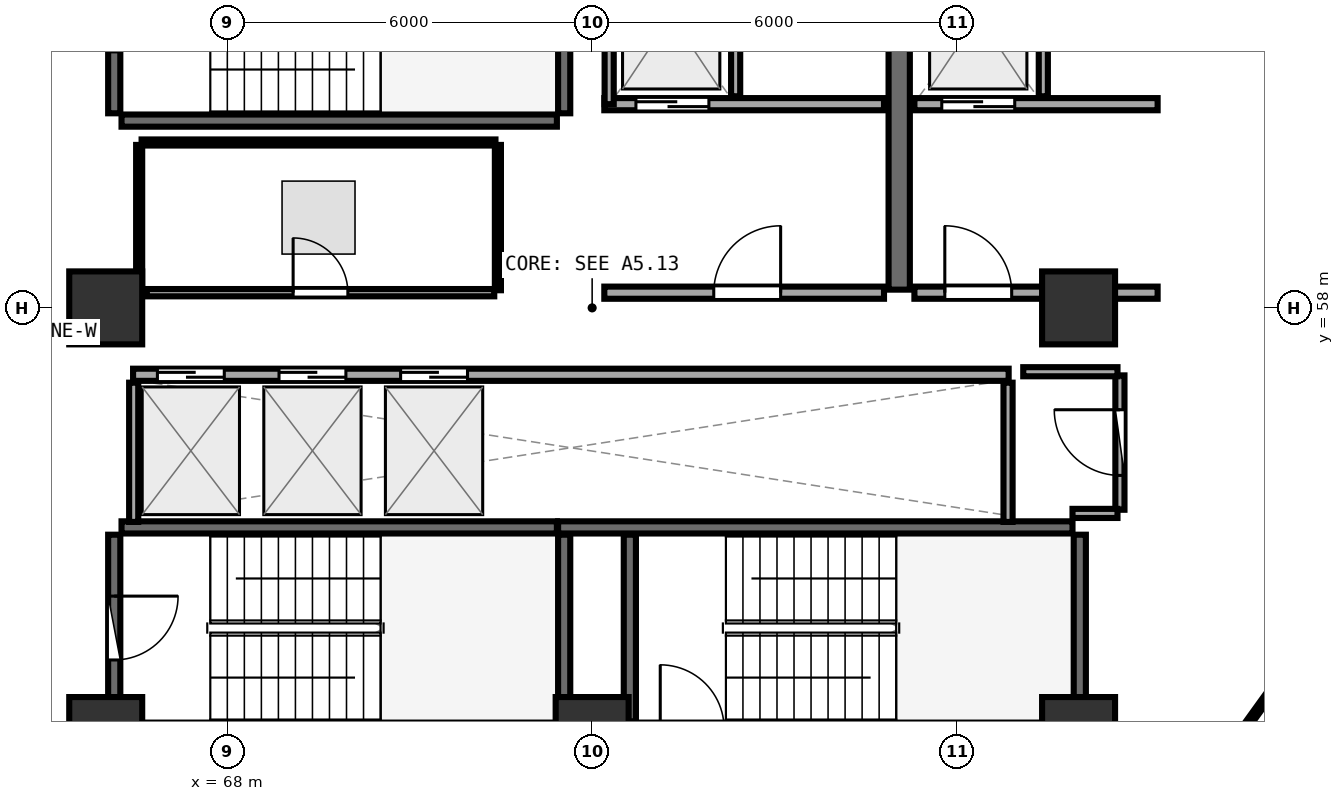
"""IFC4 building model, lengths in metres.
Left out: names, types, materials, properties, quantities, classifications, styles, units other than length and angle.
Written with IfcOpenShell. Run it as: python <this file> out.ifc"""

import sys

from ifc_helpers import new_model, si_unit, direction, frame, frame_2d, origin, origin_2d, place, context, subcontext, project, spatial, rectangle, extrude, element, fill, save


model = new_model("IFC4")
c1 = context("Model", 3, precision=1e-05, world=origin(), true_north=direction((0.0, 1.0)))
c2 = subcontext(c1, "Body", "Model", "MODEL_VIEW")
j1 = project(units=[si_unit("LENGTHUNIT", "METRE"), si_unit("PLANEANGLEUNIT", "RADIAN")], contexts=[c1])
p1 = place(None, origin())
s1 = spatial("IfcSite", under=j1, at=p1, CompositionType="ELEMENT")
p2 = place(p1, origin())
s2 = spatial("IfcBuilding", under=s1, at=p2, CompositionType="ELEMENT")
p3 = place(p2, frame((0.0, 0.0, 173.1)))
s3 = spatial("IfcBuildingStorey", under=s2, at=p3, CompositionType="ELEMENT", Elevation=173.1)
for number, where, z_axis, x_axis in (
    (1, (66.0, 51.0, 0.0), (0.0, 0.0, 1.0), (1.0, 0.0, 0.0)),
    (2, (74.0, 51.0, 0.0), (0.0, 0.0, 1.0), (1.0, 0.0, 0.0)),
    (3, (82.0, 51.0, 0.0), (0.0, 0.0, 1.0), (1.0, 0.0, 0.0)),
    (4, (82.0, 58.0, 0.0), (0.0, 0.0, 1.0), (1.0, 0.0, 0.0)),
    (5, (66.0, 58.0, 0.0), (0.0, 0.0, 1.0), (1.0, 0.0, 0.0)),
):
    element("IfcColumn", number, at=place(p3, frame(where, z_axis=z_axis, x_axis=x_axis)), inside=s3, PredefinedType="PILASTER", context=c2, shape_type="SweptSolid", body=[
        extrude(rectangle(XDim=1.2, YDim=1.2, at=origin_2d()), origin(), (0.0, 0.0, 1.0), 3.75),
    ])
p4 = place(p3, frame((66.26, 61.08, 0.0), z_axis=(0.0, 0.0, 1.0), x_axis=(1.0, 0.0, 0.0)))
e6 = element("IfcWall", 6, at=p4, inside=s3, PredefinedType="SHEAR", context=c2, shape_type="SweptSolid", body=[
    extrude(rectangle(XDim=7.16, YDim=0.2, at=frame_2d((3.58, 0.0))), origin(), (0.0, 0.0, 1.0), 3.49),
])
p5 = place(p3, frame((73.54, 61.2, 0.0), z_axis=(0.0, 0.0, 1.0), x_axis=(0.0, 1.0, 0.0)))
e7 = element("IfcWall", 7, at=p5, inside=s3, PredefinedType="SHEAR", context=c2, shape_type="SweptSolid", body=[
    extrude(rectangle(XDim=3.07, YDim=0.2, at=frame_2d((1.535, 0.0))), origin(), (0.0, 0.0, 1.0), 3.49),
])
p6 = place(p3, frame((66.14, 64.27, 0.0), z_axis=(0.0, 0.0, 1.0), x_axis=(0.0, -1.0, 0.0)))
e8 = element("IfcWall", 8, at=p6, inside=s3, PredefinedType="SHEAR", context=c2, shape_type="SweptSolid", body=[
    extrude(rectangle(XDim=3.07, YDim=0.2, at=frame_2d((1.535, 0.0))), origin(), (0.0, 0.0, 1.0), 3.49),
])
p7 = place(p6, frame((1.01, 0.0, 0.0)))
e9 = element("IfcOpeningElement", 9, at=p7, cuts=e8, PredefinedType="OPENING", context=c2, shape_type="SweptSolid", body=[
    extrude(rectangle(XDim=1.05, YDim=2.1, at=frame_2d((0.525, 1.05))), frame((0.0, 0.11, 0.0), z_axis=(0.0, -1.0, 0.0), x_axis=(1.0, 0.0, 0.0)), (0.0, 0.0, 1.0), 0.22),
])
p8 = place(p3, frame((82.02, 51.2, 0.0), z_axis=(0.0, 0.0, 1.0), x_axis=(0.0, 1.0, 0.0)))
e10 = element("IfcWall", 10, at=p8, inside=s3, PredefinedType="SHEAR", context=c2, shape_type="SweptSolid", body=[
    extrude(rectangle(XDim=3.07, YDim=0.2, at=frame_2d((1.535, 0.0))), origin(), (0.0, 0.0, 1.0), 3.49),
])
p9 = place(p3, frame((81.9, 54.39, 0.0), z_axis=(0.0, 0.0, 1.0), x_axis=(-1.0, 0.0, 0.0)))
e11 = element("IfcWall", 11, at=p9, inside=s3, PredefinedType="SHEAR", context=c2, shape_type="SweptSolid", body=[
    extrude(rectangle(XDim=8.46, YDim=0.2, at=frame_2d((4.23, 0.0))), origin(), (0.0, 0.0, 1.0), 3.49),
])
for number, where, z_axis, x_axis in (
    (12, (74.62, 54.27, 0.0), (0.0, 0.0, 1.0), (0.0, -1.0, 0.0)),
    (13, (73.54, 51.2, 0.0), (0.0, 0.0, 1.0), (0.0, 1.0, 0.0)),
):
    element("IfcWall", number, at=place(p3, frame(where, z_axis=z_axis, x_axis=x_axis)), inside=s3, PredefinedType="SHEAR", context=c2, shape_type="SweptSolid", body=[
        extrude(rectangle(XDim=3.07, YDim=0.2, at=frame_2d((1.535, 0.0))), origin(), (0.0, 0.0, 1.0), 3.49),
    ])
p10 = place(p3, frame((73.42, 54.39, 0.0), z_axis=(0.0, 0.0, 1.0), x_axis=(-1.0, 0.0, 0.0)))
e14 = element("IfcWall", 14, at=p10, inside=s3, PredefinedType="SHEAR", context=c2, shape_type="SweptSolid", body=[
    extrude(rectangle(XDim=7.16, YDim=0.2, at=frame_2d((3.58, 0.0))), origin(), (0.0, 0.0, 1.0), 3.49),
])
p11 = place(p3, frame((66.14, 54.27, 0.0), z_axis=(0.0, 0.0, 1.0), x_axis=(0.0, -1.0, 0.0)))
e15 = element("IfcWall", 15, at=p11, inside=s3, PredefinedType="SHEAR", context=c2, shape_type="SweptSolid", body=[
    extrude(rectangle(XDim=3.07, YDim=0.2, at=frame_2d((1.535, 0.0))), origin(), (0.0, 0.0, 1.0), 3.49),
])
p12 = place(p11, frame((1.01, 0.0, 0.0)))
e16 = element("IfcOpeningElement", 16, at=p12, cuts=e15, PredefinedType="OPENING", context=c2, shape_type="SweptSolid", body=[
    extrude(rectangle(XDim=1.05, YDim=2.1, at=frame_2d((0.525, 1.05))), frame((0.0, 0.11, 0.0), z_axis=(0.0, -1.0, 0.0), x_axis=(1.0, 0.0, 0.0)), (0.0, 0.0, 1.0), 0.22),
])
p13 = place(p3, frame((79.05, 58.3, 0.0), z_axis=(0.0, 0.0, 1.0), x_axis=(0.0, 1.0, 0.0)))
e17 = element("IfcWall", 17, at=p13, inside=s3, PredefinedType="SHEAR", context=c2, shape_type="SweptSolid", body=[
    extrude(rectangle(XDim=6.3, YDim=0.35, at=frame_2d((3.15, 0.0))), origin(), (0.0, 0.0, 1.0), 3.49),
])
p14 = place(p3, frame((74.2, 61.35, 0.0), z_axis=(0.0, 0.0, 1.0), x_axis=(1.0, 0.0, 0.0)))
e18 = element("IfcWall", 18, at=p14, inside=s3, PredefinedType="SOLIDWALL", context=c2, shape_type="SweptSolid", body=[
    extrude(rectangle(XDim=4.6, YDim=0.2, at=frame_2d((2.3, 0.0))), origin(), (0.0, 0.0, 1.0), 3.48),
])
p15 = place(p14, frame((0.52, 0.0, 0.0)))
e19 = element("IfcOpeningElement", 19, at=p15, cuts=e18, PredefinedType="OPENING", context=c2, shape_type="SweptSolid", body=[
    extrude(rectangle(XDim=1.2, YDim=2.15, at=frame_2d((0.6, 1.075))), frame((0.0, 0.11, 0.0), z_axis=(0.0, -1.0, 0.0), x_axis=(1.0, 0.0, 0.0)), (0.0, 0.0, 1.0), 0.22),
])
p16 = place(p3, frame((74.28, 61.35, 0.0), z_axis=(0.0, 0.0, 1.0), x_axis=(0.0, 1.0, 0.0)))
e20 = element("IfcWall", 20, at=p16, inside=s3, PredefinedType="PARTITIONING", context=c2, shape_type="SweptSolid", body=[
    extrude(rectangle(XDim=2.97, YDim=0.15, at=frame_2d((1.485, 0.0))), origin(), (0.0, 0.0, 1.0), 3.48),
])
p17 = place(p3, frame((76.36, 61.48, 0.0), z_axis=(0.0, 0.0, 1.0), x_axis=(0.0, 1.0, 0.0)))
e21 = element("IfcWall", 21, at=p17, inside=s3, PredefinedType="PARTITIONING", context=c2, shape_type="SweptSolid", body=[
    extrude(rectangle(XDim=2.84, YDim=0.15, at=frame_2d((1.42, 0.0))), origin(), (0.0, 0.0, 1.0), 3.48),
])
p18 = place(p3, frame((79.3, 61.35, 0.0), z_axis=(0.0, 0.0, 1.0), x_axis=(1.0, 0.0, 0.0)))
e22 = element("IfcWall", 22, at=p18, inside=s3, PredefinedType="SOLIDWALL", context=c2, shape_type="SweptSolid", body=[
    extrude(rectangle(XDim=4.0, YDim=0.2, at=frame_2d((2.0, 0.0))), origin(), (0.0, 0.0, 1.0), 2.775),
])
p19 = place(p18, frame((0.45, 0.0, 0.0)))
e23 = element("IfcOpeningElement", 23, at=p19, cuts=e22, PredefinedType="OPENING", context=c2, shape_type="SweptSolid", body=[
    extrude(rectangle(XDim=1.2, YDim=2.15, at=frame_2d((0.6, 1.075))), frame((0.0, 0.11, 0.0), z_axis=(0.0, -1.0, 0.0), x_axis=(1.0, 0.0, 0.0)), (0.0, 0.0, 1.0), 0.22),
])
p20 = place(p3, frame((81.42, 61.48, 0.0), z_axis=(0.0, 0.0, 1.0), x_axis=(0.0, 1.0, 0.0)))
e24 = element("IfcWall", 24, at=p20, inside=s3, PredefinedType="PARTITIONING", context=c2, shape_type="SweptSolid", body=[
    extrude(rectangle(XDim=2.84, YDim=0.15, at=frame_2d((1.42, 0.0))), origin(), (0.0, 0.0, 1.0), 3.48),
])
p21 = place(p3, frame((74.2, 58.25, 0.0), z_axis=(0.0, 0.0, 1.0), x_axis=(1.0, 0.0, 0.0)))
e25 = element("IfcWall", 25, at=p21, inside=s3, PredefinedType="SOLIDWALL", context=c2, shape_type="SweptSolid", body=[
    extrude(rectangle(XDim=4.6, YDim=0.2, at=frame_2d((2.3, 0.0))), origin(), (0.0, 0.0, 1.0), 3.48),
])
p22 = place(p21, frame((1.8, 0.0, 0.0)))
e26 = element("IfcOpeningElement", 26, at=p22, cuts=e25, PredefinedType="OPENING", context=c2, shape_type="SweptSolid", body=[
    extrude(rectangle(XDim=1.1, YDim=2.1, at=frame_2d((0.55, 1.05))), frame((0.0, 0.11, 0.0), z_axis=(0.0, -1.0, 0.0), x_axis=(1.0, 0.0, 0.0)), (0.0, 0.0, 1.0), 0.22),
])
p23 = place(p3, frame((79.3, 58.25, 0.0), z_axis=(0.0, 0.0, 1.0), x_axis=(1.0, 0.0, 0.0)))
e27 = element("IfcWall", 27, at=p23, inside=s3, PredefinedType="SOLIDWALL", context=c2, shape_type="SweptSolid", body=[
    extrude(rectangle(XDim=4.0, YDim=0.2, at=frame_2d((2.0, 0.0))), origin(), (0.0, 0.0, 1.0), 2.775),
])
p24 = place(p23, frame((0.5, 0.0, 0.0)))
e28 = element("IfcOpeningElement", 28, at=p24, cuts=e27, PredefinedType="OPENING", context=c2, shape_type="SweptSolid", body=[
    extrude(rectangle(XDim=1.1, YDim=2.1, at=frame_2d((0.55, 1.05))), frame((0.0, 0.11, 0.0), z_axis=(0.0, -1.0, 0.0), x_axis=(1.0, 0.0, 0.0)), (0.0, 0.0, 1.0), 0.22),
])
p25 = place(p3, frame((66.45, 56.9, 0.0), z_axis=(0.0, 0.0, 1.0), x_axis=(1.0, 0.0, 0.0)))
e29 = element("IfcWall", 29, at=p25, inside=s3, PredefinedType="SOLIDWALL", context=c2, shape_type="SweptSolid", body=[
    extrude(rectangle(XDim=14.4, YDim=0.2, at=frame_2d((7.2, 0.0))), origin(), (0.0, 0.0, 1.0), 3.48),
])
p26 = place(p25, frame((0.4, 0.0, 0.0)))
e30 = element("IfcOpeningElement", 30, at=p26, cuts=e29, PredefinedType="OPENING", context=c2, shape_type="SweptSolid", body=[
    extrude(rectangle(XDim=1.1, YDim=2.1, at=frame_2d((0.55, 1.05))), frame((0.0, 0.11, 0.0), z_axis=(0.0, -1.0, 0.0), x_axis=(1.0, 0.0, 0.0)), (0.0, 0.0, 1.0), 0.22),
])
p27 = place(p25, frame((2.4, 0.0, 0.0)))
e31 = element("IfcOpeningElement", 31, at=p27, cuts=e29, PredefinedType="OPENING", context=c2, shape_type="SweptSolid", body=[
    extrude(rectangle(XDim=1.1, YDim=2.1, at=frame_2d((0.55, 1.05))), frame((0.0, 0.11, 0.0), z_axis=(0.0, -1.0, 0.0), x_axis=(1.0, 0.0, 0.0)), (0.0, 0.0, 1.0), 0.22),
])
p28 = place(p25, frame((4.4, 0.0, 0.0)))
e32 = element("IfcOpeningElement", 32, at=p28, cuts=e29, PredefinedType="OPENING", context=c2, shape_type="SweptSolid", body=[
    extrude(rectangle(XDim=1.1, YDim=2.1, at=frame_2d((0.55, 1.05))), frame((0.0, 0.11, 0.0), z_axis=(0.0, -1.0, 0.0), x_axis=(1.0, 0.0, 0.0)), (0.0, 0.0, 1.0), 0.22),
])
for number, where, z_axis, x_axis in (
    (33, (66.46, 54.48, 0.0), (0.0, 0.0, 1.0), (0.0, 1.0, 0.0)),
    (34, (80.84, 54.48, 0.0), (0.0, 0.0, 1.0), (0.0, 1.0, 0.0)),
):
    element("IfcWall", number, at=place(p3, frame(where, z_axis=z_axis, x_axis=x_axis)), inside=s3, PredefinedType="PARTITIONING", context=c2, shape_type="SweptSolid", body=[
        extrude(rectangle(XDim=2.29, YDim=0.15, at=frame_2d((1.145, 0.0))), origin(), (0.0, 0.0, 1.0), 3.48),
    ])
p29 = place(p3, frame((82.68, 54.68, 0.0), z_axis=(0.0, 0.0, 1.0), x_axis=(0.0, 1.0, 0.0)))
e35 = element("IfcWall", 35, at=p29, inside=s3, PredefinedType="PARTITIONING", context=c2, shape_type="SweptSolid", body=[
    extrude(rectangle(XDim=2.21, YDim=0.15, at=frame_2d((1.105, 0.0))), origin(), (0.0, 0.0, 1.0), 3.48),
])
p30 = place(p29, frame((0.565, 0.0, 0.0)))
e36 = element("IfcOpeningElement", 36, at=p30, cuts=e35, PredefinedType="OPENING", context=c2, shape_type="SweptSolid", body=[
    extrude(rectangle(XDim=1.08, YDim=2.1, at=frame_2d((0.54, 1.05))), frame((0.0, 0.085, 0.0), z_axis=(0.0, -1.0, 0.0), x_axis=(1.0, 0.0, 0.0)), (0.0, 0.0, 1.0), 0.17),
])
p31 = place(p3, frame((66.675, 58.25, 0.0), z_axis=(0.0, 0.0, 1.0), x_axis=(1.0, 0.0, 0.0)))
e37 = element("IfcWall", 37, at=p31, inside=s3, PredefinedType="PARTITIONING", context=c2, shape_type="SweptSolid", body=[
    extrude(rectangle(XDim=5.715, YDim=0.12, at=frame_2d((2.857, 0.0))), origin(), (0.0, 0.0, 1.0), 3.48),
])
p32 = place(p31, frame((2.407, 0.0, 0.0)))
e38 = element("IfcOpeningElement", 38, at=p32, cuts=e37, PredefinedType="OPENING", context=c2, shape_type="SweptSolid", body=[
    extrude(rectangle(XDim=0.9, YDim=2.08, at=frame_2d((0.45, 1.04))), frame((0.0, 0.07, 0.0), z_axis=(0.0, -1.0, 0.0), x_axis=(1.0, 0.0, 0.0)), (0.0, 0.0, 1.0), 0.14),
])
p33 = place(p3, frame((81.9, 54.62, 0.0), z_axis=(0.0, 0.0, 1.0), x_axis=(1.0, 0.0, 0.0)))
e39 = element("IfcWall", 39, at=p33, inside=s3, PredefinedType="PARTITIONING", context=c2, shape_type="SweptSolid", body=[
    extrude(rectangle(XDim=0.74, YDim=0.15, at=frame_2d((0.37, 0.0))), origin(), (0.0, 0.0, 1.0), 2.775),
])
p34 = place(p3, frame((82.64, 56.95, 0.0), z_axis=(0.0, 0.0, 1.0), x_axis=(-1.0, 0.0, 0.0)))
e40 = element("IfcWall", 40, at=p34, inside=s3, PredefinedType="PARTITIONING", context=c2, shape_type="SweptSolid", body=[
    extrude(rectangle(XDim=1.55, YDim=0.15, at=frame_2d((0.775, 0.0))), origin(), (0.0, 0.0, 1.0), 2.775),
])
p35 = place(p3, frame((72.45, 58.29, 0.0), z_axis=(0.0, 0.0, 1.0), x_axis=(0.0, 1.0, 0.0)))
e41 = element("IfcWall", 41, at=p35, inside=s3, PredefinedType="PARTITIONING", context=c2, shape_type="SweptSolid", body=[
    extrude(rectangle(XDim=2.39, YDim=0.1, at=frame_2d((1.195, 0.0))), origin(), (0.0, 0.0, 1.0), 3.48),
])
p36 = place(p3, frame((72.41, 60.72, 0.0), z_axis=(0.0, 0.0, 1.0), x_axis=(-1.0, 0.0, 0.0)))
e42 = element("IfcWall", 42, at=p36, inside=s3, PredefinedType="PARTITIONING", context=c2, shape_type="SweptSolid", body=[
    extrude(rectangle(XDim=5.82, YDim=0.1, at=frame_2d((2.91, 0.0))), origin(), (0.0, 0.0, 1.0), 3.48),
])
p37 = place(p3, frame((66.55, 60.68, 0.0), z_axis=(0.0, 0.0, 1.0), x_axis=(0.0, -1.0, 0.0)))
e43 = element("IfcWall", 43, at=p37, inside=s3, PredefinedType="PARTITIONING", context=c2, shape_type="SweptSolid", body=[
    extrude(rectangle(XDim=2.383, YDim=0.1, at=frame_2d((1.191, 0.0))), origin(), (0.0, 0.0, 1.0), 3.48),
])
p38 = place(p3, frame((82.829, 48.448, 0.0), z_axis=(0.0, 0.0, 1.0), x_axis=(0.584802550896, 0.811175675465, 0.0)))
e44 = element("IfcWall", 44, at=p38, inside=s3, PredefinedType="PARTITIONING", context=c2, shape_type="SweptSolid", body=[
    extrude(rectangle(XDim=7.659, YDim=0.1, at=frame_2d((3.83, 0.0))), origin(), (0.0, 0.0, 1.0), 2.975),
])
p39 = place(p12, origin())
e45 = element("IfcDoor", 45, at=p39, inside=s3, OperationType="SINGLE_SWING_LEFT", PredefinedType="DOOR", context=c2, shape_type="SweptSolid", body=[
    extrude(rectangle(XDim=1.05, YDim=2.1, at=frame_2d((0.525, 1.05))), frame((0.0, 0.025, 0.0), z_axis=(0.0, -1.0, 0.0), x_axis=(1.0, 0.0, 0.0)), (0.0, 0.0, 1.0), 0.05),
])
fill(e16, e45)
p40 = place(p15, origin())
e46 = element("IfcDoor", 46, at=p40, inside=s3, OperationType="DOUBLE_DOOR_SLIDING", PredefinedType="DOOR", context=c2, shape_type="SweptSolid", body=[
    extrude(rectangle(XDim=1.2, YDim=2.15, at=frame_2d((0.6, 1.075))), frame((0.0, 0.025, 0.0), z_axis=(0.0, -1.0, 0.0), x_axis=(1.0, 0.0, 0.0)), (0.0, 0.0, 1.0), 0.05),
])
fill(e19, e46)
p41 = place(p19, origin())
e47 = element("IfcDoor", 47, at=p41, inside=s3, OperationType="DOUBLE_DOOR_SLIDING", PredefinedType="DOOR", context=c2, shape_type="SweptSolid", body=[
    extrude(rectangle(XDim=1.2, YDim=2.15, at=frame_2d((0.6, 1.075))), frame((0.0, 0.025, 0.0), z_axis=(0.0, -1.0, 0.0), x_axis=(1.0, 0.0, 0.0)), (0.0, 0.0, 1.0), 0.05),
])
fill(e23, e47)
p42 = place(p22, frame((1.1, 0.0, 0.0), z_axis=(0.0, 0.0, 1.0), x_axis=(-1.0, 0.0, 0.0)))
e48 = element("IfcDoor", 48, at=p42, inside=s3, OperationType="SINGLE_SWING_LEFT", PredefinedType="DOOR", context=c2, shape_type="SweptSolid", body=[
    extrude(rectangle(XDim=1.1, YDim=2.1, at=frame_2d((0.55, 1.05))), frame((0.0, 0.025, 0.0), z_axis=(0.0, -1.0, 0.0), x_axis=(1.0, 0.0, 0.0)), (0.0, 0.0, 1.0), 0.05),
])
fill(e26, e48)
p43 = place(p24, frame((1.1, 0.0, 0.0), z_axis=(0.0, 0.0, 1.0), x_axis=(-1.0, 0.0, 0.0)))
e49 = element("IfcDoor", 49, at=p43, inside=s3, OperationType="SINGLE_SWING_RIGHT", PredefinedType="DOOR", context=c2, shape_type="SweptSolid", body=[
    extrude(rectangle(XDim=1.1, YDim=2.1, at=frame_2d((0.55, 1.05))), frame((0.0, 0.025, 0.0), z_axis=(0.0, -1.0, 0.0), x_axis=(1.0, 0.0, 0.0)), (0.0, 0.0, 1.0), 0.05),
])
fill(e28, e49)
p44 = place(p26, origin())
e50 = element("IfcDoor", 50, at=p44, inside=s3, OperationType="DOUBLE_DOOR_SLIDING", PredefinedType="DOOR", context=c2, shape_type="SweptSolid", body=[
    extrude(rectangle(XDim=1.1, YDim=2.1, at=frame_2d((0.55, 1.05))), frame((0.0, 0.025, 0.0), z_axis=(0.0, -1.0, 0.0), x_axis=(1.0, 0.0, 0.0)), (0.0, 0.0, 1.0), 0.05),
])
fill(e30, e50)
p45 = place(p27, origin())
e51 = element("IfcDoor", 51, at=p45, inside=s3, OperationType="DOUBLE_DOOR_SLIDING", PredefinedType="DOOR", context=c2, shape_type="SweptSolid", body=[
    extrude(rectangle(XDim=1.1, YDim=2.1, at=frame_2d((0.55, 1.05))), frame((0.0, 0.025, 0.0), z_axis=(0.0, -1.0, 0.0), x_axis=(1.0, 0.0, 0.0)), (0.0, 0.0, 1.0), 0.05),
])
fill(e31, e51)
p46 = place(p28, origin())
e52 = element("IfcDoor", 52, at=p46, inside=s3, OperationType="DOUBLE_DOOR_SLIDING", PredefinedType="DOOR", context=c2, shape_type="SweptSolid", body=[
    extrude(rectangle(XDim=1.1, YDim=2.1, at=frame_2d((0.55, 1.05))), frame((0.0, 0.025, 0.0), z_axis=(0.0, -1.0, 0.0), x_axis=(1.0, 0.0, 0.0)), (0.0, 0.0, 1.0), 0.05),
])
fill(e32, e52)
p47 = place(p30, origin())
e53 = element("IfcDoor", 53, at=p47, inside=s3, OperationType="SINGLE_SWING_RIGHT", PredefinedType="DOOR", context=c2, shape_type="SweptSolid", body=[
    extrude(rectangle(XDim=1.08, YDim=2.1, at=frame_2d((0.54, 1.05))), frame((0.0, 0.025, 0.0), z_axis=(0.0, -1.0, 0.0), x_axis=(1.0, 0.0, 0.0)), (0.0, 0.0, 1.0), 0.05),
])
fill(e36, e53)
p48 = place(p32, origin())
e54 = element("IfcDoor", 54, at=p48, inside=s3, OperationType="SINGLE_SWING_LEFT", PredefinedType="DOOR", context=c2, shape_type="SweptSolid", body=[
    extrude(rectangle(XDim=0.9, YDim=2.08, at=frame_2d((0.45, 1.04))), frame((0.0, 0.025, 0.0), z_axis=(0.0, -1.0, 0.0), x_axis=(1.0, 0.0, 0.0)), (0.0, 0.0, 1.0), 0.05),
])
fill(e38, e54)
save(model, sys.argv[1])
